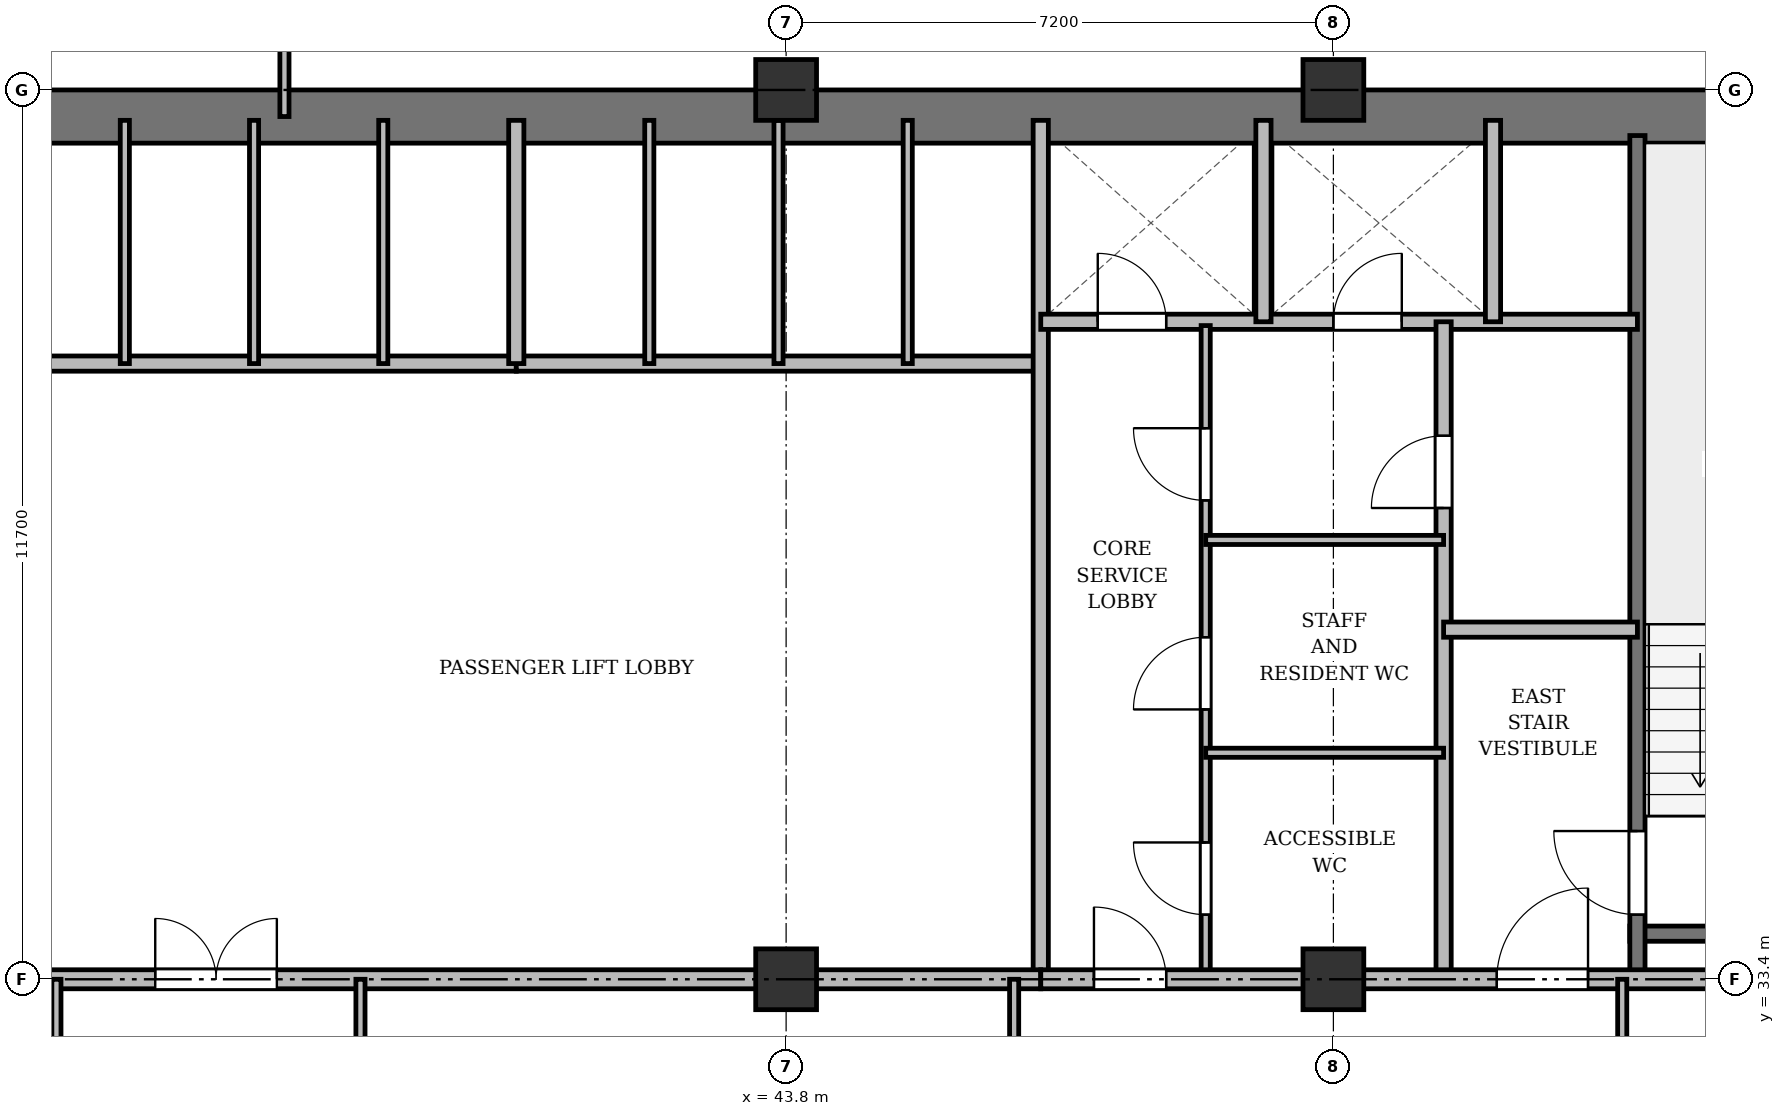
"""IFC4 building model, lengths in metres.
Left out: names, types, materials, properties, quantities, classifications, styles, units other than length and angle.
Written with IfcOpenShell. Run it as: python <this file> out.ifc"""

import sys

from ifc_helpers import new_model, si_unit, direction, frame, frame_2d, origin, origin_2d, place, context, subcontext, project, spatial, rectangle, extrude, source, transform, mapped, element, fill, save


model = new_model("IFC4")
c1 = context("Model", 3, precision=1e-05, world=origin(), true_north=direction((0.0, 1.0)))
c2 = subcontext(c1, "Body", "Model", "MODEL_VIEW")
j1 = project(units=[si_unit("LENGTHUNIT", "METRE"), si_unit("PLANEANGLEUNIT", "RADIAN")], contexts=[c1])
p1 = place(None, origin())
s1 = spatial("IfcSite", under=j1, at=p1, CompositionType="ELEMENT")
p2 = place(p1, origin())
s2 = spatial("IfcBuilding", under=s1, at=p2, CompositionType="ELEMENT")
p3 = place(p2, frame((0.0, 0.0, 124.9)))
s3 = spatial("IfcBuildingStorey", under=s2, at=p3, CompositionType="ELEMENT", Elevation=124.9)
m1 = source(origin(), c2, "Body", "SweptSolid", [
    extrude(rectangle(XDim=0.8, YDim=0.8, at=origin_2d()), origin(), (0.0, 0.0, 1.0), 3.6),
])
for number, where, z_axis, x_axis in (
    (1, (43.8, 33.4, 0.0), (0.0, 0.0, 1.0), (1.0, 0.0, 0.0)),
    (2, (43.8, 45.1, 0.0), (0.0, 0.0, 1.0), (1.0, 0.0, 0.0)),
    (3, (51.0, 33.4, 0.0), (0.0, 0.0, 1.0), (1.0, 0.0, 0.0)),
    (4, (51.0, 45.1, 0.0), (0.0, 0.0, 1.0), (1.0, 0.0, 0.0)),
):
    element("IfcColumn", number, at=place(p3, frame(where, z_axis=z_axis, x_axis=x_axis)), inside=s3, PredefinedType="COLUMN", context=c2, shape_type="MappedRepresentation", body=[
        mapped(m1, transform((0.0, 0.0, 0.0), x_axis=(1.0, 0.0, 0.0), y_axis=(0.0, 1.0, 0.0), z_axis=(0.0, 0.0, 1.0), scale=1.0)),
    ])
p4 = place(p3, frame((15.5, 44.75, 0.0), z_axis=(0.0, 0.0, 1.0), x_axis=(1.0, 0.0, 0.0)))
e5 = element("IfcWall", 5, at=p4, inside=s3, PredefinedType="SHEAR", context=c2, shape_type="SweptSolid", body=[
    extrude(rectangle(XDim=43.4, YDim=0.7, at=frame_2d((21.7, 0.0))), origin(), (0.0, 0.0, 1.0), 3.34),
])
p5 = place(p3, frame((54.9, 34.0, 0.0), z_axis=(0.0, 0.0, 1.0), x_axis=(1.0, 0.0, 0.0)))
e6 = element("IfcWall", 6, at=p5, inside=s3, PredefinedType="SHEAR", context=c2, shape_type="SweptSolid", body=[
    extrude(rectangle(XDim=3.4, YDim=0.2, at=frame_2d((1.7, 0.0))), origin(), (0.0, 0.0, 1.0), 3.34),
])
p6 = place(p3, frame((55.0, 33.4, 0.0), z_axis=(0.0, 0.0, 1.0), x_axis=(0.0, 1.0, 0.0)))
e7 = element("IfcWall", 7, at=p6, inside=s3, PredefinedType="SHEAR", context=c2, shape_type="SweptSolid", body=[
    extrude(rectangle(XDim=11.1, YDim=0.2, at=frame_2d((5.55, 0.0))), origin(), (0.0, 0.0, 1.0), 3.34),
])
p7 = place(p6, frame((0.85, 0.0, 0.0)))
e8 = element("IfcOpeningElement", 8, at=p7, cuts=e7, PredefinedType="OPENING", context=c2, shape_type="SweptSolid", body=[
    extrude(rectangle(XDim=1.1, YDim=2.15, at=frame_2d((0.55, 1.075))), frame((0.0, 0.11, 0.0), z_axis=(0.0, -1.0, 0.0), x_axis=(1.0, 0.0, 0.0)), (0.0, 0.0, 1.0), 0.22),
])
p8 = place(p3, frame((33.35, 41.5, 0.0), z_axis=(0.0, 0.0, 1.0), x_axis=(1.0, 0.0, 0.0)))
e9 = element("IfcWall", 9, at=p8, inside=s3, PredefinedType="SOLIDWALL", context=c2, shape_type="SweptSolid", body=[
    extrude(rectangle(XDim=6.9, YDim=0.2, at=frame_2d((3.45, 0.0))), origin(), (0.0, 0.0, 1.0), 3.34),
])
for number, where, z_axis, x_axis in (
    (10, (35.1, 41.5, 0.0), (0.0, 0.0, 1.0), (0.0, 1.0, 0.0)),
    (11, (36.8, 41.5, 0.0), (0.0, 0.0, 1.0), (0.0, 1.0, 0.0)),
    (12, (38.5, 41.5, 0.0), (0.0, 0.0, 1.0), (0.0, 1.0, 0.0)),
):
    element("IfcWall", number, at=place(p3, frame(where, z_axis=z_axis, x_axis=x_axis)), inside=s3, PredefinedType="PARTITIONING", context=c2, shape_type="SweptSolid", body=[
        extrude(rectangle(XDim=3.2, YDim=0.12, at=frame_2d((1.6, 0.0))), origin(), (0.0, 0.0, 1.0), 3.34),
    ])
p9 = place(p3, frame((40.25, 41.5, 0.0), z_axis=(0.0, 0.0, 1.0), x_axis=(1.0, 0.0, 0.0)))
e13 = element("IfcWall", 13, at=p9, inside=s3, PredefinedType="SOLIDWALL", context=c2, shape_type="SweptSolid", body=[
    extrude(rectangle(XDim=6.9, YDim=0.2, at=frame_2d((3.45, 0.0))), origin(), (0.0, 0.0, 1.0), 3.34),
])
p10 = place(p3, frame((40.25, 41.5, 0.0), z_axis=(0.0, 0.0, 1.0), x_axis=(0.0, 1.0, 0.0)))
e14 = element("IfcWall", 14, at=p10, inside=s3, PredefinedType="SOLIDWALL", context=c2, shape_type="SweptSolid", body=[
    extrude(rectangle(XDim=3.2, YDim=0.2, at=frame_2d((1.6, 0.0))), origin(), (0.0, 0.0, 1.0), 3.34),
])
for number, where, z_axis, x_axis in (
    (15, (42.0, 41.5, 0.0), (0.0, 0.0, 1.0), (0.0, 1.0, 0.0)),
    (16, (43.7, 41.5, 0.0), (0.0, 0.0, 1.0), (0.0, 1.0, 0.0)),
    (17, (45.4, 41.5, 0.0), (0.0, 0.0, 1.0), (0.0, 1.0, 0.0)),
):
    element("IfcWall", number, at=place(p3, frame(where, z_axis=z_axis, x_axis=x_axis)), inside=s3, PredefinedType="PARTITIONING", context=c2, shape_type="SweptSolid", body=[
        extrude(rectangle(XDim=3.2, YDim=0.12, at=frame_2d((1.6, 0.0))), origin(), (0.0, 0.0, 1.0), 3.34),
    ])
p11 = place(p3, frame((47.15, 33.4, 0.0), z_axis=(0.0, 0.0, 1.0), x_axis=(0.0, 1.0, 0.0)))
e18 = element("IfcWall", 18, at=p11, inside=s3, PredefinedType="SOLIDWALL", context=c2, shape_type="SweptSolid", body=[
    extrude(rectangle(XDim=11.3, YDim=0.2, at=frame_2d((5.65, 0.0))), origin(), (0.0, 0.0, 1.0), 2.752),
])
p12 = place(p3, frame((26.3, 33.4, 0.0), z_axis=(0.0, 0.0, 1.0), x_axis=(1.0, 0.0, 0.0)))
e19 = element("IfcWall", 19, at=p12, inside=s3, PredefinedType="PARTITIONING", context=c2, shape_type="SweptSolid", body=[
    extrude(rectangle(XDim=20.85, YDim=0.25, at=frame_2d((10.425, 0.0))), origin(), (0.0, 0.0, 1.0), 2.752),
])
p13 = place(p12, frame((9.2, 0.0, 0.0)))
e20 = element("IfcOpeningElement", 20, at=p13, cuts=e19, PredefinedType="OPENING", context=c2, shape_type="SweptSolid", body=[
    extrude(rectangle(XDim=1.6, YDim=2.2, at=frame_2d((0.8, 1.1))), frame((0.0, 0.135, 0.0), z_axis=(0.0, -1.0, 0.0), x_axis=(1.0, 0.0, 0.0)), (0.0, 0.0, 1.0), 0.27),
])
p14 = place(p3, frame((47.15, 42.05, 0.0), z_axis=(0.0, 0.0, 1.0), x_axis=(1.0, 0.0, 0.0)))
e21 = element("IfcWall", 21, at=p14, inside=s3, PredefinedType="SOLIDWALL", context=c2, shape_type="SweptSolid", body=[
    extrude(rectangle(XDim=7.85, YDim=0.2, at=frame_2d((3.925, 0.0))), origin(), (0.0, 0.0, 1.0), 2.84),
])
p15 = place(p14, frame((0.75, 0.0, 0.0)))
e22 = element("IfcOpeningElement", 22, at=p15, cuts=e21, PredefinedType="OPENING", context=c2, shape_type="SweptSolid", body=[
    extrude(rectangle(XDim=0.9, YDim=2.1, at=frame_2d((0.45, 1.05))), frame((0.0, 0.11, 0.0), z_axis=(0.0, -1.0, 0.0), x_axis=(1.0, 0.0, 0.0)), (0.0, 0.0, 1.0), 0.22),
])
p16 = place(p14, frame((3.85, 0.0, 0.0)))
e23 = element("IfcOpeningElement", 23, at=p16, cuts=e21, PredefinedType="OPENING", context=c2, shape_type="SweptSolid", body=[
    extrude(rectangle(XDim=0.9, YDim=2.1, at=frame_2d((0.45, 1.05))), frame((0.0, 0.11, 0.0), z_axis=(0.0, -1.0, 0.0), x_axis=(1.0, 0.0, 0.0)), (0.0, 0.0, 1.0), 0.22),
])
for number, where, z_axis, x_axis in (
    (24, (50.08, 42.05, 0.0), (0.0, 0.0, 1.0), (0.0, 1.0, 0.0)),
    (25, (53.1, 42.05, 0.0), (0.0, 0.0, 1.0), (0.0, 1.0, 0.0)),
):
    element("IfcWall", number, at=place(p3, frame(where, z_axis=z_axis, x_axis=x_axis)), inside=s3, PredefinedType="SOLIDWALL", context=c2, shape_type="SweptSolid", body=[
        extrude(rectangle(XDim=2.65, YDim=0.2, at=frame_2d((1.325, 0.0))), origin(), (0.0, 0.0, 1.0), 3.34),
    ])
p17 = place(p3, frame((52.45, 33.4, 0.0), z_axis=(0.0, 0.0, 1.0), x_axis=(0.0, 1.0, 0.0)))
e26 = element("IfcWall", 26, at=p17, inside=s3, PredefinedType="PARTITIONING", context=c2, shape_type="SweptSolid", body=[
    extrude(rectangle(XDim=8.65, YDim=0.2, at=frame_2d((4.325, 0.0))), origin(), (0.0, 0.0, 1.0), 2.752),
])
p18 = place(p17, frame((6.2, 0.0, 0.0)))
e27 = element("IfcOpeningElement", 27, at=p18, cuts=e26, PredefinedType="OPENING", context=c2, shape_type="SweptSolid", body=[
    extrude(rectangle(XDim=0.95, YDim=2.15, at=frame_2d((0.475, 1.075))), frame((0.0, 0.11, 0.0), z_axis=(0.0, -1.0, 0.0), x_axis=(1.0, 0.0, 0.0)), (0.0, 0.0, 1.0), 0.22),
])
p19 = place(p3, frame((52.45, 38.0, 0.0), z_axis=(0.0, 0.0, 1.0), x_axis=(1.0, 0.0, 0.0)))
e28 = element("IfcWall", 28, at=p19, inside=s3, PredefinedType="PARTITIONING", context=c2, shape_type="SweptSolid", body=[
    extrude(rectangle(XDim=2.55, YDim=0.2, at=frame_2d((1.275, 0.0))), origin(), (0.0, 0.0, 1.0), 3.34),
])
p20 = place(p3, frame((49.32, 33.4, 0.0), z_axis=(0.0, 0.0, 1.0), x_axis=(0.0, 1.0, 0.0)))
e29 = element("IfcWall", 29, at=p20, inside=s3, PredefinedType="PARTITIONING", context=c2, shape_type="SweptSolid", body=[
    extrude(rectangle(XDim=8.6, YDim=0.12, at=frame_2d((4.3, 0.0))), origin(), (0.0, 0.0, 1.0), 2.752),
])
p21 = place(p20, frame((0.85, 0.0, 0.0)))
e30 = element("IfcOpeningElement", 30, at=p21, cuts=e29, PredefinedType="OPENING", context=c2, shape_type="SweptSolid", body=[
    extrude(rectangle(XDim=0.95, YDim=2.15, at=frame_2d((0.475, 1.075))), frame((0.0, 0.07, 0.0), z_axis=(0.0, -1.0, 0.0), x_axis=(1.0, 0.0, 0.0)), (0.0, 0.0, 1.0), 0.14),
])
p22 = place(p20, frame((3.55, 0.0, 0.0)))
e31 = element("IfcOpeningElement", 31, at=p22, cuts=e29, PredefinedType="OPENING", context=c2, shape_type="SweptSolid", body=[
    extrude(rectangle(XDim=0.95, YDim=2.15, at=frame_2d((0.475, 1.075))), frame((0.0, 0.07, 0.0), z_axis=(0.0, -1.0, 0.0), x_axis=(1.0, 0.0, 0.0)), (0.0, 0.0, 1.0), 0.14),
])
p23 = place(p20, frame((6.3, 0.0, 0.0)))
e32 = element("IfcOpeningElement", 32, at=p23, cuts=e29, PredefinedType="OPENING", context=c2, shape_type="SweptSolid", body=[
    extrude(rectangle(XDim=0.95, YDim=2.15, at=frame_2d((0.475, 1.075))), frame((0.0, 0.07, 0.0), z_axis=(0.0, -1.0, 0.0), x_axis=(1.0, 0.0, 0.0)), (0.0, 0.0, 1.0), 0.14),
])
for number, where, z_axis, x_axis in (
    (33, (49.32, 36.38, 0.0), (0.0, 0.0, 1.0), (1.0, 0.0, 0.0)),
    (34, (49.32, 39.18, 0.0), (0.0, 0.0, 1.0), (1.0, 0.0, 0.0)),
):
    element("IfcWall", number, at=place(p3, frame(where, z_axis=z_axis, x_axis=x_axis)), inside=s3, PredefinedType="PARTITIONING", context=c2, shape_type="SweptSolid", body=[
        extrude(rectangle(XDim=3.13, YDim=0.12, at=frame_2d((1.565, 0.0))), origin(), (0.0, 0.0, 1.0), 2.84),
    ])
p24 = place(p3, frame((47.15, 33.4, 0.0), z_axis=(0.0, 0.0, 1.0), x_axis=(1.0, 0.0, 0.0)))
e35 = element("IfcWall", 35, at=p24, inside=s3, PredefinedType="PARTITIONING", context=c2, shape_type="SweptSolid", body=[
    extrude(rectangle(XDim=11.15, YDim=0.25, at=frame_2d((5.575, 0.0))), origin(), (0.0, 0.0, 1.0), 2.752),
])
p25 = place(p24, frame((0.7, 0.0, 0.0)))
e36 = element("IfcOpeningElement", 36, at=p25, cuts=e35, PredefinedType="OPENING", context=c2, shape_type="SweptSolid", body=[
    extrude(rectangle(XDim=0.95, YDim=2.15, at=frame_2d((0.475, 1.075))), frame((0.0, 0.135, 0.0), z_axis=(0.0, -1.0, 0.0), x_axis=(1.0, 0.0, 0.0)), (0.0, 0.0, 1.0), 0.27),
])
p26 = place(p24, frame((6.0, 0.0, 0.0)))
e37 = element("IfcOpeningElement", 37, at=p26, cuts=e35, PredefinedType="OPENING", context=c2, shape_type="SweptSolid", body=[
    extrude(rectangle(XDim=1.2, YDim=2.15, at=frame_2d((0.6, 1.075))), frame((0.0, 0.135, 0.0), z_axis=(0.0, -1.0, 0.0), x_axis=(1.0, 0.0, 0.0)), (0.0, 0.0, 1.0), 0.27),
])
for number, where, z_axis, x_axis in (
    (38, (34.2, 29.8, 0.0), (0.0, 0.0, 1.0), (0.0, 1.0, 0.0)),
    (39, (38.2, 29.8, 0.0), (0.0, 0.0, 1.0), (0.0, 1.0, 0.0)),
    (40, (46.8, 29.8, 0.0), (0.0, 0.0, 1.0), (0.0, 1.0, 0.0)),
    (41, (54.8, 29.8, 0.0), (0.0, 0.0, 1.0), (0.0, 1.0, 0.0)),
):
    element("IfcWall", number, at=place(p3, frame(where, z_axis=z_axis, x_axis=x_axis)), inside=s3, PredefinedType="PARTITIONING", context=c2, shape_type="SweptSolid", body=[
        extrude(rectangle(XDim=3.6, YDim=0.12, at=frame_2d((1.8, 0.0))), origin(), (0.0, 0.0, 1.0), 2.752),
    ])
p27 = place(p3, frame((37.2, 44.75, 0.0), z_axis=(0.0, 0.0, 1.0), x_axis=(0.0, 1.0, 0.0)))
e42 = element("IfcWall", 42, at=p27, inside=s3, PredefinedType="PARTITIONING", context=c2, shape_type="SweptSolid", body=[
    extrude(rectangle(XDim=3.61, YDim=0.12, at=frame_2d((1.805, 0.0))), origin(), (0.0, 0.0, 1.0), 2.752),
])
p28 = place(p27, frame((1.1, 0.0, 0.0)))
e43 = element("IfcOpeningElement", 43, at=p28, cuts=e42, PredefinedType="OPENING", context=c2, shape_type="SweptSolid", body=[
    extrude(rectangle(XDim=0.95, YDim=2.15, at=frame_2d((0.475, 1.075))), frame((0.0, 0.07, 0.0), z_axis=(0.0, -1.0, 0.0), x_axis=(1.0, 0.0, 0.0)), (0.0, 0.0, 1.0), 0.14),
])
m2 = source(origin(), c2, "Body", "SweptSolid", [
    extrude(rectangle(XDim=1.1, YDim=2.15, at=frame_2d((0.55, 1.075))), frame((0.0, 0.025, 0.0), z_axis=(0.0, -1.0, 0.0), x_axis=(1.0, 0.0, 0.0)), (0.0, 0.0, 1.0), 0.05),
])
p29 = place(p7, origin())
e44 = element("IfcDoor", 44, at=p29, inside=s3, OperationType="SINGLE_SWING_RIGHT", PredefinedType="DOOR", context=c2, shape_type="MappedRepresentation", body=[
    mapped(m2, transform((0.0, 0.0, 0.0), x_axis=(1.0, 0.0, 0.0), y_axis=(0.0, 1.0, 0.0), z_axis=(0.0, 0.0, 1.0), scale=1.0)),
])
fill(e8, e44)
m3 = source(origin(), c2, "Body", "SweptSolid", [
    extrude(rectangle(XDim=1.6, YDim=2.2, at=frame_2d((0.8, 1.1))), frame((0.0, 0.025, 0.0), z_axis=(0.0, -1.0, 0.0), x_axis=(1.0, 0.0, 0.0)), (0.0, 0.0, 1.0), 0.05),
])
p30 = place(p13, origin())
e45 = element("IfcDoor", 45, at=p30, inside=s3, OperationType="DOUBLE_DOOR_SINGLE_SWING", PredefinedType="DOOR", context=c2, shape_type="MappedRepresentation", body=[
    mapped(m3, transform((0.0, 0.0, 0.0), x_axis=(1.0, 0.0, 0.0), y_axis=(0.0, 1.0, 0.0), z_axis=(0.0, 0.0, 1.0), scale=1.0)),
])
fill(e20, e45)
m4 = source(origin(), c2, "Body", "SweptSolid", [
    extrude(rectangle(XDim=0.9, YDim=2.1, at=frame_2d((0.45, 1.05))), frame((0.0, 0.025, 0.0), z_axis=(0.0, -1.0, 0.0), x_axis=(1.0, 0.0, 0.0)), (0.0, 0.0, 1.0), 0.05),
])
p31 = place(p15, origin())
e46 = element("IfcDoor", 46, at=p31, inside=s3, OperationType="SINGLE_SWING_LEFT", PredefinedType="DOOR", context=c2, shape_type="MappedRepresentation", body=[
    mapped(m4, transform((0.0, 0.0, 0.0), x_axis=(1.0, 0.0, 0.0), y_axis=(0.0, 1.0, 0.0), z_axis=(0.0, 0.0, 1.0), scale=1.0)),
])
fill(e22, e46)
p32 = place(p16, origin())
e47 = element("IfcDoor", 47, at=p32, inside=s3, OperationType="SINGLE_SWING_RIGHT", PredefinedType="DOOR", context=c2, shape_type="MappedRepresentation", body=[
    mapped(m4, transform((0.0, 0.0, 0.0), x_axis=(1.0, 0.0, 0.0), y_axis=(0.0, 1.0, 0.0), z_axis=(0.0, 0.0, 1.0), scale=1.0)),
])
fill(e23, e47)
m5 = source(origin(), c2, "Body", "SweptSolid", [
    extrude(rectangle(XDim=0.95, YDim=2.15, at=frame_2d((0.475, 1.075))), frame((0.0, 0.025, 0.0), z_axis=(0.0, -1.0, 0.0), x_axis=(1.0, 0.0, 0.0)), (0.0, 0.0, 1.0), 0.05),
])
p33 = place(p18, origin())
e48 = element("IfcDoor", 48, at=p33, inside=s3, OperationType="SINGLE_SWING_LEFT", PredefinedType="DOOR", context=c2, shape_type="MappedRepresentation", body=[
    mapped(m5, transform((0.0, 0.0, 0.0), x_axis=(1.0, 0.0, 0.0), y_axis=(0.0, 1.0, 0.0), z_axis=(0.0, 0.0, 1.0), scale=1.0)),
])
fill(e27, e48)
p34 = place(p21, origin())
e49 = element("IfcDoor", 49, at=p34, inside=s3, OperationType="SINGLE_SWING_RIGHT", PredefinedType="DOOR", context=c2, shape_type="MappedRepresentation", body=[
    mapped(m5, transform((0.0, 0.0, 0.0), x_axis=(1.0, 0.0, 0.0), y_axis=(0.0, 1.0, 0.0), z_axis=(0.0, 0.0, 1.0), scale=1.0)),
])
fill(e30, e49)
p35 = place(p22, origin())
e50 = element("IfcDoor", 50, at=p35, inside=s3, OperationType="SINGLE_SWING_LEFT", PredefinedType="DOOR", context=c2, shape_type="MappedRepresentation", body=[
    mapped(m5, transform((0.0, 0.0, 0.0), x_axis=(1.0, 0.0, 0.0), y_axis=(0.0, 1.0, 0.0), z_axis=(0.0, 0.0, 1.0), scale=1.0)),
])
fill(e31, e50)
p36 = place(p23, origin())
e51 = element("IfcDoor", 51, at=p36, inside=s3, OperationType="SINGLE_SWING_RIGHT", PredefinedType="DOOR", context=c2, shape_type="MappedRepresentation", body=[
    mapped(m5, transform((0.0, 0.0, 0.0), x_axis=(1.0, 0.0, 0.0), y_axis=(0.0, 1.0, 0.0), z_axis=(0.0, 0.0, 1.0), scale=1.0)),
])
fill(e32, e51)
p37 = place(p25, origin())
e52 = element("IfcDoor", 52, at=p37, inside=s3, OperationType="SINGLE_SWING_LEFT", PredefinedType="DOOR", context=c2, shape_type="MappedRepresentation", body=[
    mapped(m5, transform((0.0, 0.0, 0.0), x_axis=(1.0, 0.0, 0.0), y_axis=(0.0, 1.0, 0.0), z_axis=(0.0, 0.0, 1.0), scale=1.0)),
])
fill(e36, e52)
m6 = source(origin(), c2, "Body", "SweptSolid", [
    extrude(rectangle(XDim=1.2, YDim=2.15, at=frame_2d((0.6, 1.075))), frame((0.0, 0.025, 0.0), z_axis=(0.0, -1.0, 0.0), x_axis=(1.0, 0.0, 0.0)), (0.0, 0.0, 1.0), 0.05),
])
p38 = place(p26, origin())
e53 = element("IfcDoor", 53, at=p38, inside=s3, OperationType="SINGLE_SWING_RIGHT", PredefinedType="DOOR", context=c2, shape_type="MappedRepresentation", body=[
    mapped(m6, transform((0.0, 0.0, 0.0), x_axis=(1.0, 0.0, 0.0), y_axis=(0.0, 1.0, 0.0), z_axis=(0.0, 0.0, 1.0), scale=1.0)),
])
fill(e37, e53)
save(model, sys.argv[1])
